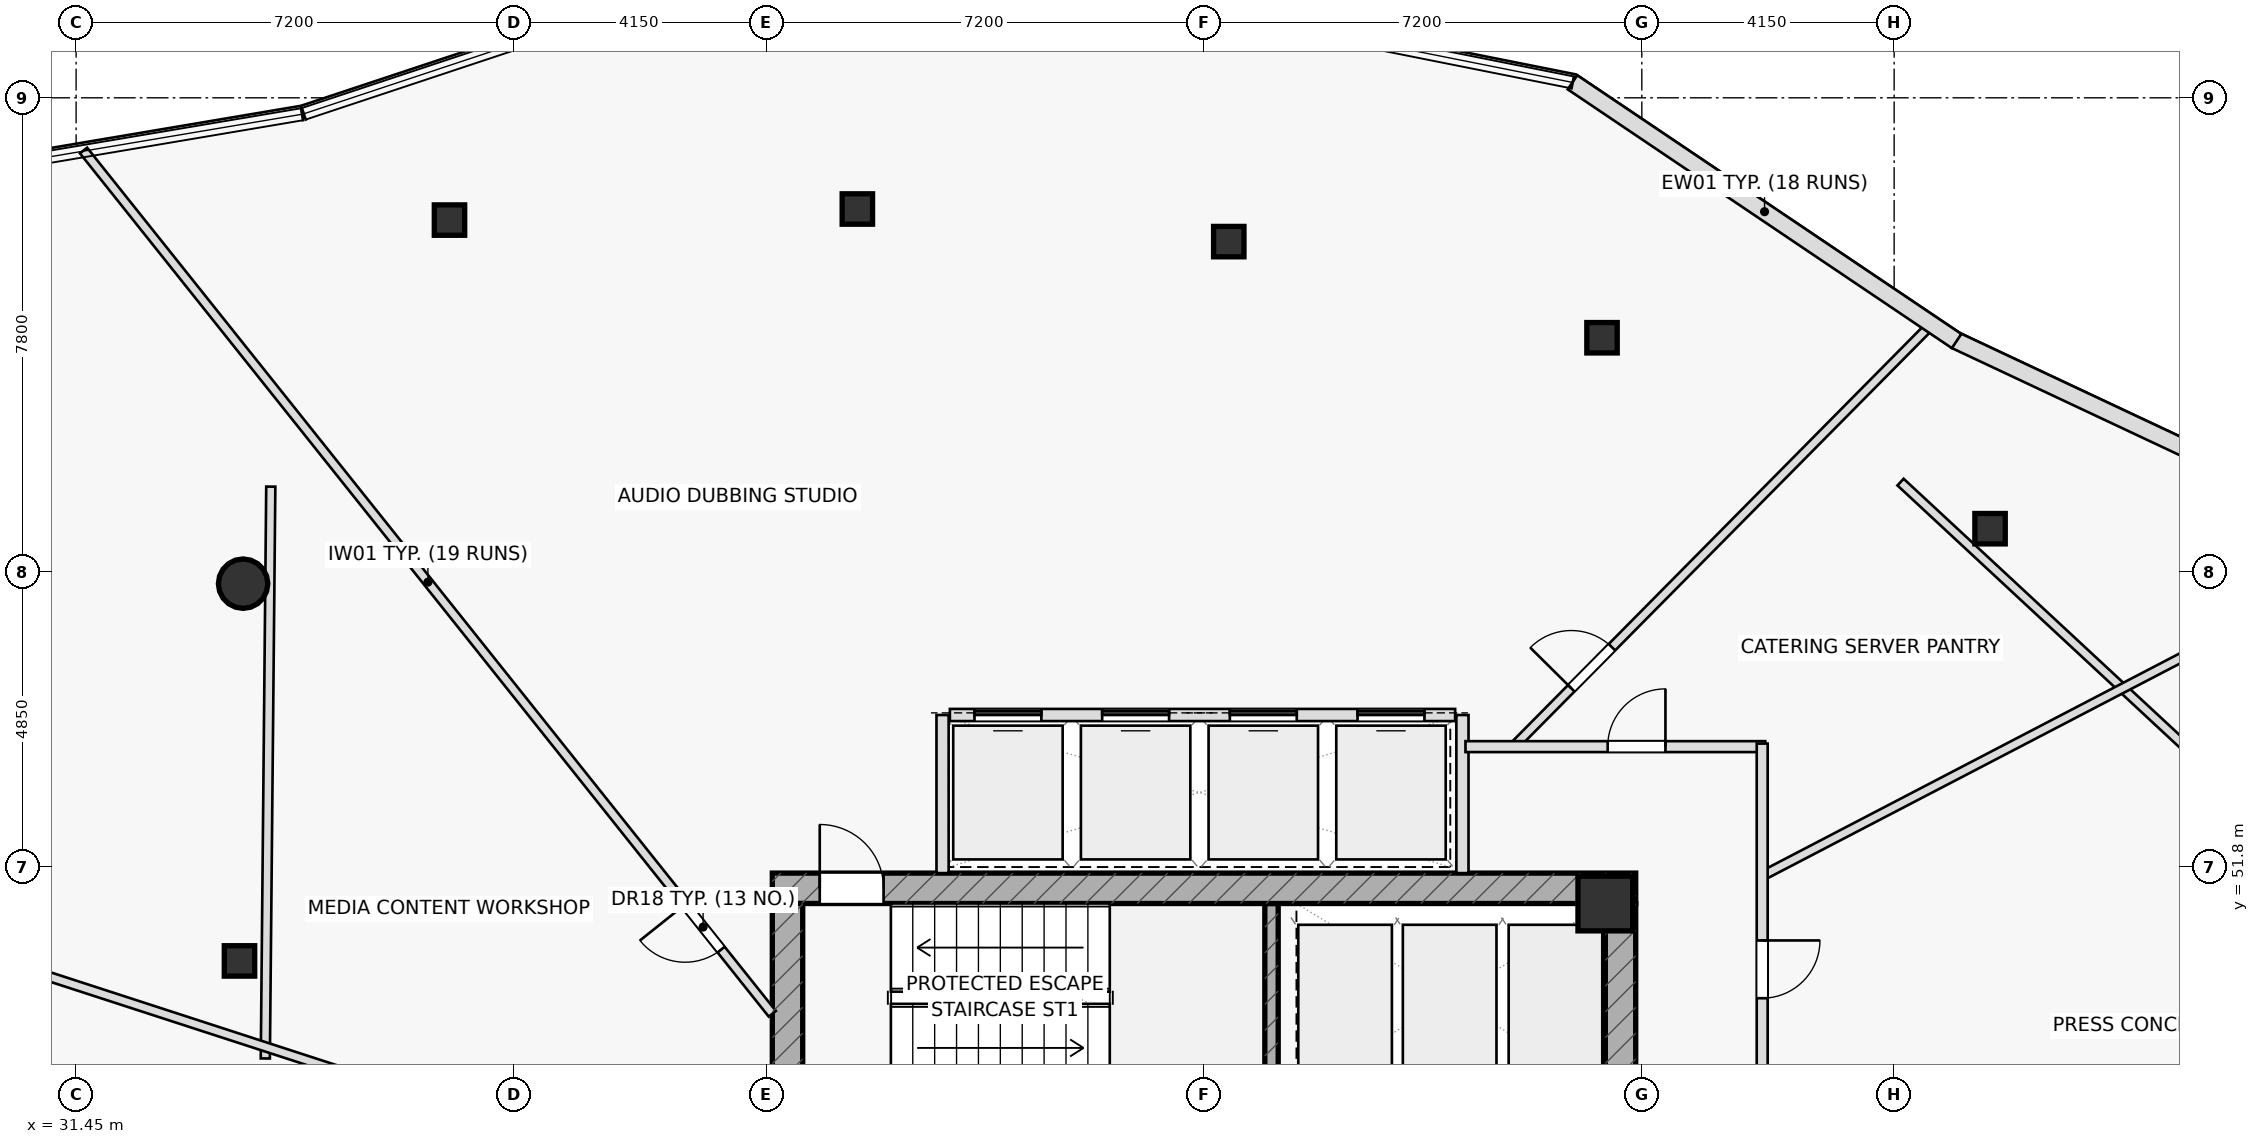
"""IFC4 building model, lengths in metres.
Left out: names, types, materials, properties, quantities, classifications, styles, units other than length and angle.
Written with IfcOpenShell. Run it as: python <this file> out.ifc"""

import sys

from ifc_helpers import new_model, si_unit, direction, frame, frame_2d, origin, origin_2d, place, context, subcontext, project, spatial, rectangle, hollow_rectangle, hollow_circle, extrude, element, fill, save


model = new_model("IFC4")
c1 = context("Model", 3, precision=1e-05, world=origin(), true_north=direction((0.0, 1.0)))
c2 = subcontext(c1, "Body", "Model", "MODEL_VIEW")
j1 = project(units=[si_unit("LENGTHUNIT", "METRE"), si_unit("PLANEANGLEUNIT", "RADIAN")], contexts=[c1])
p1 = place(None, origin())
s1 = spatial("IfcSite", under=j1, at=p1, CompositionType="ELEMENT")
p2 = place(p1, origin())
s2 = spatial("IfcBuilding", under=s1, at=p2, CompositionType="ELEMENT")
p3 = place(p2, frame((0.0, 0.0, 261.65)))
s3 = spatial("IfcBuildingStorey", under=s2, at=p3, CompositionType="ELEMENT", Elevation=261.65)
p4 = place(p3, frame((51.11, 48.1, 0.0), z_axis=(0.0, 0.0, 1.0), x_axis=(0.0, 1.0, 0.0)))
e1 = element("IfcWall", 1, at=p4, inside=s3, PredefinedType="SHEAR", context=c2, shape_type="SweptSolid", body=[
    extrude(rectangle(XDim=3.1, YDim=0.22, at=frame_2d((1.55, 0.0))), origin(), (0.0, 0.0, 1.0), 3.65),
])
p5 = place(p3, frame((42.9, 51.45, 0.0), z_axis=(0.0, 0.0, 1.0), x_axis=(1.0, 0.0, 0.0)))
e2 = element("IfcWall", 2, at=p5, inside=s3, PredefinedType="SHEAR", context=c2, shape_type="SweptSolid", body=[
    extrude(rectangle(XDim=14.2, YDim=0.5, at=frame_2d((7.1, 0.0))), origin(), (0.0, 0.0, 1.0), 3.65),
])
p6 = place(p5, frame((0.78, 0.0, 0.0)))
e3 = element("IfcOpeningElement", 3, at=p6, cuts=e2, PredefinedType="OPENING", context=c2, shape_type="SweptSolid", body=[
    extrude(rectangle(XDim=1.05, YDim=2.2, at=frame_2d((0.525, 1.1))), frame((0.0, 0.26, 0.0), z_axis=(0.0, -1.0, 0.0), x_axis=(1.0, 0.0, 0.0)), (0.0, 0.0, 1.0), 0.52),
])
p7 = place(p3, frame((43.15, 38.8, 0.0), z_axis=(0.0, 0.0, 1.0), x_axis=(0.0, 1.0, 0.0)))
e4 = element("IfcWall", 4, at=p7, inside=s3, PredefinedType="SHEAR", context=c2, shape_type="SweptSolid", body=[
    extrude(rectangle(XDim=12.4, YDim=0.5, at=frame_2d((6.2, 0.0))), origin(), (0.0, 0.0, 1.0), 3.65),
])
p8 = place(p3, frame((56.85, 38.8, 0.0), z_axis=(0.0, 0.0, 1.0), x_axis=(0.0, 1.0, 0.0)))
e5 = element("IfcWall", 5, at=p8, inside=s3, PredefinedType="SHEAR", context=c2, shape_type="SweptSolid", body=[
    extrude(rectangle(XDim=12.4, YDim=0.5, at=frame_2d((6.2, 0.0))), origin(), (0.0, 0.0, 1.0), 3.65),
])
p9 = place(p8, frame((3.85, 0.0, 0.0)))
e6 = element("IfcOpeningElement", 6, at=p9, cuts=e5, PredefinedType="OPENING", context=c2, shape_type="SweptSolid", body=[
    extrude(rectangle(XDim=1.5, YDim=2.2, at=frame_2d((0.75, 1.1))), frame((0.0, 0.26, 0.0), z_axis=(0.0, -1.0, 0.0), x_axis=(1.0, 0.0, 0.0)), (0.0, 0.0, 1.0), 0.52),
])
p10 = place(p3, frame((56.6, 51.2, 0.0), z_axis=(0.0, 0.0, 1.0), x_axis=(1.0, 0.0, 0.0)))
e7 = element("IfcColumn", 7, at=p10, inside=s3, PredefinedType="COLUMN", context=c2, shape_type="SweptSolid", body=[
    extrude(rectangle(XDim=0.9, YDim=0.9, at=origin_2d()), origin(), (0.0, 0.0, 1.0), 3.65),
])
p11 = place(p3, frame((34.196, 56.46, 0.0), z_axis=(0.0, 0.0, 1.0), x_axis=(1.0, 0.0, 0.0)))
e8 = element("IfcColumn", 8, at=p11, inside=s3, PredefinedType="COLUMN", context=c2, shape_type="SweptSolid", body=[
    extrude(hollow_circle(Radius=0.406, WallThickness=0.036, at=origin_2d()), origin(), (0.0, 0.0, 1.0), 3.65),
])
for number, where, z_axis, x_axis in (
    (9, (34.137, 50.256, 0.0), (0.0, 0.0, 1.0), (1.0, 0.0, 0.0)),
    (10, (62.927, 57.364, 0.0), (0.0, 0.0, 1.0), (1.0, 0.0, 0.0)),
    (11, (56.546, 60.504, 0.0), (0.0, 0.0, 1.0), (1.0, 0.0, 0.0)),
    (12, (50.407, 62.085, 0.0), (0.0, 0.0, 1.0), (1.0, 0.0, 0.0)),
    (13, (44.299, 62.621, 0.0), (0.0, 0.0, 1.0), (1.0, 0.0, 0.0)),
    (14, (37.591, 62.439, 0.0), (0.0, 0.0, 1.0), (1.0, 0.0, 0.0)),
):
    element("IfcColumn", number, at=place(p3, frame(where, z_axis=z_axis, x_axis=x_axis)), inside=s3, PredefinedType="COLUMN", context=c2, shape_type="SweptSolid", body=[
        extrude(hollow_rectangle(XDim=0.5, YDim=0.5, WallThickness=0.03, at=origin_2d()), origin(), (0.0, 0.0, 1.0), 3.65),
    ])
for number, where, z_axis, x_axis in (
    (15, (45.7, 51.7, 0.0), (0.0, 0.0, 1.0), (0.0, 1.0, 0.0)),
    (16, (54.25, 51.7, 0.0), (0.0, 0.0, 1.0), (0.0, 1.0, 0.0)),
):
    element("IfcWall", number, at=place(p3, frame(where, z_axis=z_axis, x_axis=x_axis)), inside=s3, PredefinedType="PARTITIONING", context=c2, shape_type="SweptSolid", body=[
        extrude(rectangle(XDim=2.6, YDim=0.2, at=frame_2d((1.3, 0.0))), origin(), (0.0, 0.0, 1.0), 3.65),
    ])
p12 = place(p3, frame((34.652, 58.056, 0.0), z_axis=(0.0, 0.0, 1.0), x_axis=(-0.009553538759, -0.999954363907, 0.0)))
e17 = element("IfcWall", 17, at=p12, inside=s3, PredefinedType="PARTITIONING", context=c2, shape_type="SweptSolid", body=[
    extrude(rectangle(XDim=9.404, YDim=0.15, at=frame_2d((4.702, 0.0))), origin(), (0.0, 0.0, 1.0), 3.175),
])
p13 = place(p3, frame((69.792, 50.388, 0.0), z_axis=(0.0, 0.0, 1.0), x_axis=(-0.732769799181, 0.680476613418, 0.0)))
e18 = element("IfcWall", 18, at=p13, inside=s3, PredefinedType="PARTITIONING", context=c2, shape_type="SweptSolid", body=[
    extrude(rectangle(XDim=11.378, YDim=0.15, at=frame_2d((5.689, 0.0))), origin(), (0.0, 0.0, 1.0), 3.075),
])
p14 = place(p3, frame((42.9, 49.386, 0.0), z_axis=(0.0, 0.0, 1.0), x_axis=(-0.623702774592, 0.781661594916, 0.0)))
e19 = element("IfcWall", 19, at=p14, inside=s3, PredefinedType="PARTITIONING", context=c2, shape_type="SweptSolid", body=[
    extrude(rectangle(XDim=18.162, YDim=0.15, at=frame_2d((9.081, 0.0))), origin(), (0.0, 0.0, 1.0), 3.075),
])
p15 = place(p14, frame((1.35, 0.0, 0.0)))
e20 = element("IfcOpeningElement", 20, at=p15, cuts=e19, PredefinedType="OPENING", context=c2, shape_type="SweptSolid", body=[
    extrude(rectangle(XDim=0.95, YDim=2.05, at=frame_2d((0.475, 1.025))), frame((0.0, 0.085, 0.0), z_axis=(0.0, -1.0, 0.0), x_axis=(1.0, 0.0, 0.0)), (0.0, 0.0, 1.0), 0.17),
])
p16 = place(p3, frame((37.344, 47.94, 0.0), z_axis=(0.0, 0.0, 1.0), x_axis=(-0.951130517785, 0.308789148348, 0.0)))
e21 = element("IfcWall", 21, at=p16, inside=s3, PredefinedType="PARTITIONING", context=c2, shape_type="SweptSolid", body=[
    extrude(rectangle(XDim=13.034, YDim=0.15, at=frame_2d((6.517, 0.0))), origin(), (0.0, 0.0, 1.0), 3.175),
])
p17 = place(p3, frame((59.18, 51.654, 0.0), z_axis=(0.0, 0.0, 1.0), x_axis=(0.886978708339, 0.461810319237, 0.0)))
e22 = element("IfcWall", 22, at=p17, inside=s3, PredefinedType="PARTITIONING", context=c2, shape_type="SweptSolid", body=[
    extrude(rectangle(XDim=11.607, YDim=0.15, at=frame_2d((5.803, 0.0))), origin(), (0.0, 0.0, 1.0), 3.175),
])
p18 = place(p3, frame((55.091, 53.78, 0.0), z_axis=(0.0, 0.0, 1.0), x_axis=(0.703479316765, 0.710715731417, 0.0)))
e23 = element("IfcWall", 23, at=p18, inside=s3, PredefinedType="PARTITIONING", context=c2, shape_type="SweptSolid", body=[
    extrude(rectangle(XDim=9.784, YDim=0.15, at=frame_2d((4.892, 0.0))), origin(), (0.0, 0.0, 1.0), 3.075),
])
p19 = place(p18, frame((1.35, 0.0, 0.0)))
e24 = element("IfcOpeningElement", 24, at=p19, cuts=e23, PredefinedType="OPENING", context=c2, shape_type="SweptSolid", body=[
    extrude(rectangle(XDim=0.95, YDim=2.05, at=frame_2d((0.475, 1.025))), frame((0.0, 0.085, 0.0), z_axis=(0.0, -1.0, 0.0), x_axis=(1.0, 0.0, 0.0)), (0.0, 0.0, 1.0), 0.17),
])
p20 = place(p3, frame((54.3, 53.78, 0.0), z_axis=(0.0, 0.0, 1.0), x_axis=(1.0, 0.0, 0.0)))
e25 = element("IfcWall", 25, at=p20, inside=s3, PredefinedType="PARTITIONING", context=c2, shape_type="SweptSolid", body=[
    extrude(rectangle(XDim=4.93, YDim=0.18, at=frame_2d((2.465, 0.0))), origin(), (0.0, 0.0, 1.0), 3.65),
])
p21 = place(p20, frame((2.339, 0.0, 0.0)))
e26 = element("IfcOpeningElement", 26, at=p21, cuts=e25, PredefinedType="OPENING", context=c2, shape_type="SweptSolid", body=[
    extrude(rectangle(XDim=0.95, YDim=2.05, at=frame_2d((0.475, 1.025))), frame((0.0, 0.1, 0.0), z_axis=(0.0, -1.0, 0.0), x_axis=(1.0, 0.0, 0.0)), (0.0, 0.0, 1.0), 0.2),
])
p22 = place(p3, frame((59.18, 53.83, 0.0), z_axis=(0.0, 0.0, 1.0), x_axis=(0.0, -1.0, 0.0)))
e27 = element("IfcWall", 27, at=p22, inside=s3, PredefinedType="PARTITIONING", context=c2, shape_type="SweptSolid", body=[
    extrude(rectangle(XDim=5.53, YDim=0.18, at=frame_2d((2.765, 0.0))), origin(), (0.0, 0.0, 1.0), 3.65),
])
p23 = place(p22, frame((3.238, 0.0, 0.0)))
e28 = element("IfcOpeningElement", 28, at=p23, cuts=e27, PredefinedType="OPENING", context=c2, shape_type="SweptSolid", body=[
    extrude(rectangle(XDim=0.95, YDim=2.05, at=frame_2d((0.475, 1.025))), frame((0.0, 0.1, 0.0), z_axis=(0.0, -1.0, 0.0), x_axis=(1.0, 0.0, 0.0)), (0.0, 0.0, 1.0), 0.2),
])
p24 = place(p3, frame((68.67, 57.494, 0.0), z_axis=(0.0, 0.0, 1.0), x_axis=(-0.904983452417, 0.425446766179, 0.0)))
e29 = element("IfcWall", 29, at=p24, inside=s3, PredefinedType="STANDARD", context=c2, shape_type="SweptSolid", body=[
    extrude(rectangle(XDim=6.983, YDim=0.28, at=frame_2d((3.491, 0.0))), origin(), (0.0, 0.0, 1.0), 3.65),
])
p25 = place(p3, frame((62.377, 60.45, 0.0), z_axis=(0.0, 0.0, 1.0), x_axis=(-0.829407525921, 0.558644033304, 0.0)))
e30 = element("IfcWall", 30, at=p25, inside=s3, PredefinedType="STANDARD", context=c2, shape_type="SweptSolid", body=[
    extrude(rectangle(XDim=7.616, YDim=0.28, at=frame_2d((3.808, 0.0))), origin(), (0.0, 0.0, 1.0), 3.65),
])
p26 = place(p3, frame((45.82, 54.3, 0.0), z_axis=(0.0, 0.0, 1.0), x_axis=(1.0, 0.0, 0.0)))
e31 = element("IfcWall", 31, at=p26, inside=s3, PredefinedType="PARTITIONING", context=c2, shape_type="SweptSolid", body=[
    extrude(rectangle(XDim=8.31, YDim=0.2, at=frame_2d((4.155, 0.0))), origin(), (0.0, 0.0, 1.0), 3.65),
])
p27 = place(p26, frame((0.405, 0.0, 0.0)))
e32 = element("IfcOpeningElement", 32, at=p27, cuts=e31, PredefinedType="OPENING", context=c2, shape_type="SweptSolid", body=[
    extrude(rectangle(XDim=1.1, YDim=2.15, at=frame_2d((0.55, 1.075))), frame((0.0, 0.11, 0.0), z_axis=(0.0, -1.0, 0.0), x_axis=(1.0, 0.0, 0.0)), (0.0, 0.0, 1.0), 0.22),
])
p28 = place(p26, frame((2.505, 0.0, 0.0)))
e33 = element("IfcOpeningElement", 33, at=p28, cuts=e31, PredefinedType="OPENING", context=c2, shape_type="SweptSolid", body=[
    extrude(rectangle(XDim=1.1, YDim=2.15, at=frame_2d((0.55, 1.075))), frame((0.0, 0.11, 0.0), z_axis=(0.0, -1.0, 0.0), x_axis=(1.0, 0.0, 0.0)), (0.0, 0.0, 1.0), 0.22),
])
p29 = place(p26, frame((4.605, 0.0, 0.0)))
e34 = element("IfcOpeningElement", 34, at=p29, cuts=e31, PredefinedType="OPENING", context=c2, shape_type="SweptSolid", body=[
    extrude(rectangle(XDim=1.1, YDim=2.15, at=frame_2d((0.55, 1.075))), frame((0.0, 0.11, 0.0), z_axis=(0.0, -1.0, 0.0), x_axis=(1.0, 0.0, 0.0)), (0.0, 0.0, 1.0), 0.22),
])
p30 = place(p26, frame((6.705, 0.0, 0.0)))
e35 = element("IfcOpeningElement", 35, at=p30, cuts=e31, PredefinedType="OPENING", context=c2, shape_type="SweptSolid", body=[
    extrude(rectangle(XDim=1.1, YDim=2.15, at=frame_2d((0.55, 1.075))), frame((0.0, 0.11, 0.0), z_axis=(0.0, -1.0, 0.0), x_axis=(1.0, 0.0, 0.0)), (0.0, 0.0, 1.0), 0.22),
])
p31 = place(p6, origin())
e36 = element("IfcDoor", 36, at=p31, inside=s3, OperationType="SINGLE_SWING_LEFT", PredefinedType="DOOR", context=c2, shape_type="SweptSolid", body=[
    extrude(rectangle(XDim=1.05, YDim=2.2, at=frame_2d((0.525, 1.1))), frame((0.0, 0.025, 0.0), z_axis=(0.0, -1.0, 0.0), x_axis=(1.0, 0.0, 0.0)), (0.0, 0.0, 1.0), 0.05),
])
fill(e3, e36)
p32 = place(p15, origin())
e37 = element("IfcDoor", 37, at=p32, inside=s3, OperationType="SINGLE_SWING_RIGHT", PredefinedType="DOOR", context=c2, shape_type="SweptSolid", body=[
    extrude(rectangle(XDim=0.95, YDim=2.05, at=frame_2d((0.475, 1.025))), frame((0.0, 0.025, 0.0), z_axis=(0.0, -1.0, 0.0), x_axis=(1.0, 0.0, 0.0)), (0.0, 0.0, 1.0), 0.05),
])
fill(e20, e37)
p33 = place(p19, origin())
e38 = element("IfcDoor", 38, at=p33, inside=s3, OperationType="SINGLE_SWING_LEFT", PredefinedType="DOOR", context=c2, shape_type="SweptSolid", body=[
    extrude(rectangle(XDim=0.95, YDim=2.05, at=frame_2d((0.475, 1.025))), frame((0.0, 0.025, 0.0), z_axis=(0.0, -1.0, 0.0), x_axis=(1.0, 0.0, 0.0)), (0.0, 0.0, 1.0), 0.05),
])
fill(e24, e38)
p34 = place(p21, origin())
e39 = element("IfcDoor", 39, at=p34, inside=s3, OperationType="SINGLE_SWING_RIGHT", PredefinedType="DOOR", context=c2, shape_type="SweptSolid", body=[
    extrude(rectangle(XDim=0.95, YDim=2.05, at=frame_2d((0.475, 1.025))), frame((0.0, 0.025, 0.0), z_axis=(0.0, -1.0, 0.0), x_axis=(1.0, 0.0, 0.0)), (0.0, 0.0, 1.0), 0.05),
])
fill(e26, e39)
p35 = place(p23, origin())
e40 = element("IfcDoor", 40, at=p35, inside=s3, OperationType="SINGLE_SWING_LEFT", PredefinedType="DOOR", context=c2, shape_type="SweptSolid", body=[
    extrude(rectangle(XDim=0.95, YDim=2.05, at=frame_2d((0.475, 1.025))), frame((0.0, 0.025, 0.0), z_axis=(0.0, -1.0, 0.0), x_axis=(1.0, 0.0, 0.0)), (0.0, 0.0, 1.0), 0.05),
])
fill(e28, e40)
p36 = place(p27, origin())
e41 = element("IfcDoor", 41, at=p36, inside=s3, OperationType="SLIDING_TO_LEFT", PredefinedType="DOOR", context=c2, shape_type="SweptSolid", body=[
    extrude(rectangle(XDim=1.1, YDim=2.15, at=frame_2d((0.55, 1.075))), frame((0.0, 0.025, 0.0), z_axis=(0.0, -1.0, 0.0), x_axis=(1.0, 0.0, 0.0)), (0.0, 0.0, 1.0), 0.05),
])
fill(e32, e41)
p37 = place(p28, origin())
e42 = element("IfcDoor", 42, at=p37, inside=s3, OperationType="SLIDING_TO_RIGHT", PredefinedType="DOOR", context=c2, shape_type="SweptSolid", body=[
    extrude(rectangle(XDim=1.1, YDim=2.15, at=frame_2d((0.55, 1.075))), frame((0.0, 0.025, 0.0), z_axis=(0.0, -1.0, 0.0), x_axis=(1.0, 0.0, 0.0)), (0.0, 0.0, 1.0), 0.05),
])
fill(e33, e42)
p38 = place(p29, origin())
e43 = element("IfcDoor", 43, at=p38, inside=s3, OperationType="SLIDING_TO_LEFT", PredefinedType="DOOR", context=c2, shape_type="SweptSolid", body=[
    extrude(rectangle(XDim=1.1, YDim=2.15, at=frame_2d((0.55, 1.075))), frame((0.0, 0.025, 0.0), z_axis=(0.0, -1.0, 0.0), x_axis=(1.0, 0.0, 0.0)), (0.0, 0.0, 1.0), 0.05),
])
fill(e34, e43)
p39 = place(p30, origin())
e44 = element("IfcDoor", 44, at=p39, inside=s3, OperationType="SLIDING_TO_RIGHT", PredefinedType="DOOR", context=c2, shape_type="SweptSolid", body=[
    extrude(rectangle(XDim=1.1, YDim=2.15, at=frame_2d((0.55, 1.075))), frame((0.0, 0.025, 0.0), z_axis=(0.0, -1.0, 0.0), x_axis=(1.0, 0.0, 0.0)), (0.0, 0.0, 1.0), 0.05),
])
fill(e35, e44)
save(model, sys.argv[1])
